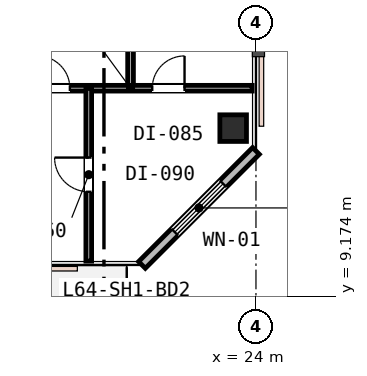
"""IFC4 building model, lengths in metres.
Left out: names, types, materials, properties, quantities, classifications, styles, units other than length and angle.
Written with IfcOpenShell. Run it as: python <this file> out.ifc"""

import sys

from ifc_helpers import new_model, si_unit, direction, frame, frame_2d, origin, origin_2d, place, context, subcontext, project, spatial, rectangle, extrude, element, fill, save


model = new_model("IFC4")
c1 = context("Model", 3, precision=1e-05, world=origin(), true_north=direction((0.0, 1.0)))
c2 = subcontext(c1, "Body", "Model", "MODEL_VIEW")
j1 = project(units=[si_unit("LENGTHUNIT", "METRE"), si_unit("PLANEANGLEUNIT", "RADIAN")], contexts=[c1])
p1 = place(None, origin())
s1 = spatial("IfcSite", under=j1, at=p1, CompositionType="ELEMENT")
p2 = place(p1, origin())
s2 = spatial("IfcBuilding", under=s1, at=p2, CompositionType="ELEMENT")
p3 = place(p2, frame((0.0, 0.0, 248.8)))
s3 = spatial("IfcBuildingStorey", under=s2, at=p3, CompositionType="ELEMENT", Elevation=248.8)
p4 = place(p3, frame((23.4, 13.6, 0.0), z_axis=(0.0, 0.0, 1.0), x_axis=(1.0, 0.0, 0.0)))
e1 = element("IfcColumn", 1, at=p4, inside=s3, PredefinedType="COLUMN", context=c2, shape_type="SweptSolid", body=[
    extrude(rectangle(XDim=0.7, YDim=0.7, at=origin_2d()), origin(), (0.0, 0.0, 1.0), 3.8),
])
p5 = place(p3, frame((21.0, 10.0, 0.0), z_axis=(0.0, 0.0, 1.0), x_axis=(0.707106781187, 0.707106781187, 0.0)))
e2 = element("IfcWall", 2, at=p5, inside=s3, PredefinedType="STANDARD", context=c2, shape_type="SweptSolid", body=[
    extrude(rectangle(XDim=4.243, YDim=0.25, at=frame_2d((2.121, 0.0))), origin(), (0.0, 0.0, 1.0), 3.53),
])
p6 = place(p5, frame((1.221, 0.0, 0.75)))
e3 = element("IfcOpeningElement", 3, at=p6, cuts=e2, PredefinedType="OPENING", context=c2, shape_type="SweptSolid", body=[
    extrude(rectangle(XDim=1.8, YDim=1.85, at=frame_2d((0.9, 0.925))), frame((0.0, 0.135, 0.0), z_axis=(0.0, -1.0, 0.0), x_axis=(1.0, 0.0, 0.0)), (0.0, 0.0, 1.0), 0.27),
])
p7 = place(p3, frame((20.7, 14.65, 0.0), z_axis=(0.0, 0.0, 1.0), x_axis=(0.0, 1.0, 0.0)))
e4 = element("IfcWall", 4, at=p7, inside=s3, PredefinedType="PARTITIONING", context=c2, shape_type="SweptSolid", body=[
    extrude(rectangle(XDim=2.35, YDim=0.15, at=frame_2d((1.175, 0.0))), origin(), (0.0, 0.0, 1.0), 3.28),
])
p8 = place(p3, frame((17.5, 14.65, 0.0), z_axis=(0.0, 0.0, 1.0), x_axis=(1.0, 0.0, 0.0)))
e5 = element("IfcWall", 5, at=p8, inside=s3, PredefinedType="PARTITIONING", context=c2, shape_type="SweptSolid", body=[
    extrude(rectangle(XDim=6.4, YDim=0.15, at=frame_2d((3.2, 0.0))), origin(), (0.0, 0.0, 1.0), 3.27),
])
p9 = place(p8, frame((0.753, 0.0, 0.0)))
e6 = element("IfcOpeningElement", 6, at=p9, cuts=e5, PredefinedType="OPENING", context=c2, shape_type="SweptSolid", body=[
    extrude(rectangle(XDim=0.85, YDim=2.15, at=frame_2d((0.425, 1.075))), frame((0.0, 0.085, 0.0), z_axis=(0.0, -1.0, 0.0), x_axis=(1.0, 0.0, 0.0)), (0.0, 0.0, 1.0), 0.17),
])
p10 = place(p8, frame((3.771, 0.0, 0.0)))
e7 = element("IfcOpeningElement", 7, at=p10, cuts=e5, PredefinedType="OPENING", context=c2, shape_type="SweptSolid", body=[
    extrude(rectangle(XDim=0.85, YDim=2.15, at=frame_2d((0.425, 1.075))), frame((0.0, 0.085, 0.0), z_axis=(0.0, -1.0, 0.0), x_axis=(1.0, 0.0, 0.0)), (0.0, 0.0, 1.0), 0.17),
])
p11 = place(p3, frame((19.6, 10.1, 0.0), z_axis=(0.0, 0.0, 1.0), x_axis=(0.0, 1.0, 0.0)))
e8 = element("IfcWall", 8, at=p11, inside=s3, PredefinedType="PARTITIONING", context=c2, shape_type="SweptSolid", body=[
    extrude(rectangle(XDim=4.55, YDim=0.15, at=frame_2d((2.275, 0.0))), origin(), (0.0, 0.0, 1.0), 3.16),
])
p12 = place(p11, frame((1.825, 0.0, 0.0)))
e9 = element("IfcOpeningElement", 9, at=p12, cuts=e8, PredefinedType="OPENING", context=c2, shape_type="SweptSolid", body=[
    extrude(rectangle(XDim=0.9, YDim=2.15, at=frame_2d((0.45, 1.075))), frame((0.0, 0.085, 0.0), z_axis=(0.0, -1.0, 0.0), x_axis=(1.0, 0.0, 0.0)), (0.0, 0.0, 1.0), 0.17),
])
p13 = place(p6, origin())
e10 = element("IfcWindow", 10, at=p13, inside=s3, PartitioningType="SINGLE_PANEL", PredefinedType="WINDOW", context=c2, shape_type="SweptSolid", body=[
    extrude(rectangle(XDim=1.8, YDim=1.85, at=frame_2d((0.9, 0.925))), frame((0.0, 0.03, 0.0), z_axis=(0.0, -1.0, 0.0), x_axis=(1.0, 0.0, 0.0)), (0.0, 0.0, 1.0), 0.06),
])
fill(e3, e10)
p14 = place(p9, origin())
e11 = element("IfcDoor", 11, at=p14, inside=s3, OperationType="SINGLE_SWING_LEFT", PredefinedType="DOOR", context=c2, shape_type="SweptSolid", body=[
    extrude(rectangle(XDim=0.85, YDim=2.15, at=frame_2d((0.425, 1.075))), frame((0.0, 0.025, 0.0), z_axis=(0.0, -1.0, 0.0), x_axis=(1.0, 0.0, 0.0)), (0.0, 0.0, 1.0), 0.05),
])
fill(e6, e11)
p15 = place(p10, origin())
e12 = element("IfcDoor", 12, at=p15, inside=s3, OperationType="SINGLE_SWING_RIGHT", PredefinedType="DOOR", context=c2, shape_type="SweptSolid", body=[
    extrude(rectangle(XDim=0.85, YDim=2.15, at=frame_2d((0.425, 1.075))), frame((0.0, 0.025, 0.0), z_axis=(0.0, -1.0, 0.0), x_axis=(1.0, 0.0, 0.0)), (0.0, 0.0, 1.0), 0.05),
])
fill(e7, e12)
p16 = place(p12, origin())
e13 = element("IfcDoor", 13, at=p16, inside=s3, OperationType="SINGLE_SWING_RIGHT", PredefinedType="DOOR", context=c2, shape_type="SweptSolid", body=[
    extrude(rectangle(XDim=0.9, YDim=2.15, at=frame_2d((0.45, 1.075))), frame((0.0, 0.025, 0.0), z_axis=(0.0, -1.0, 0.0), x_axis=(1.0, 0.0, 0.0)), (0.0, 0.0, 1.0), 0.05),
])
fill(e9, e13)
save(model, sys.argv[1])
